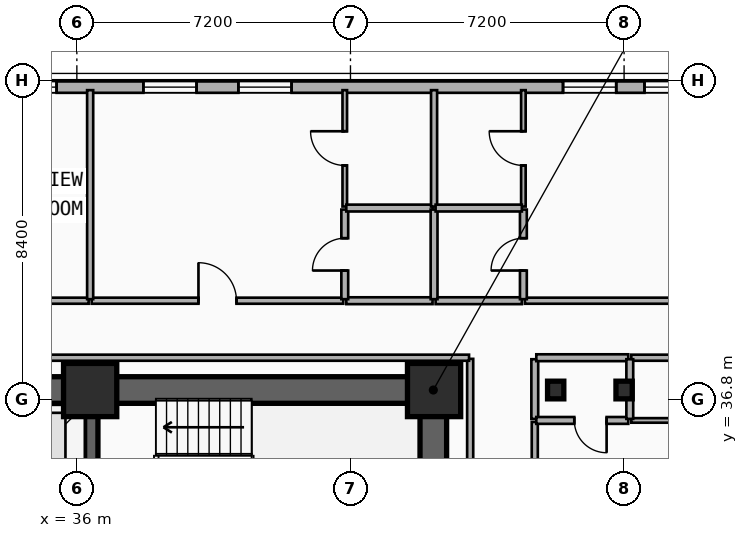
"""IFC4 building model, lengths in metres.
Left out: names, types, materials, properties, quantities, classifications, styles, units other than length and angle.
Written with IfcOpenShell. Run it as: python <this file> out.ifc"""

import sys

from ifc_helpers import new_model, si_unit, direction, frame, frame_2d, origin, origin_2d, place, context, subcontext, project, spatial, rectangle, i_section, extrude, element, fill, save


model = new_model("IFC4")
c1 = context("Model", 3, precision=1e-05, world=origin(), true_north=direction((0.0, 1.0)))
c2 = subcontext(c1, "Body", "Model", "MODEL_VIEW")
j1 = project(units=[si_unit("LENGTHUNIT", "METRE"), si_unit("PLANEANGLEUNIT", "RADIAN")], contexts=[c1])
p1 = place(None, origin())
s1 = spatial("IfcSite", under=j1, at=p1, CompositionType="ELEMENT")
p2 = place(p1, origin())
s2 = spatial("IfcBuilding", under=s1, at=p2, CompositionType="ELEMENT")
p3 = place(p2, frame((0.0, 0.0, 39.5)))
s3 = spatial("IfcBuildingStorey", under=s2, at=p3, CompositionType="ELEMENT", Elevation=39.5)
p4 = place(p3, frame((12.15, 37.05, 0.0), z_axis=(0.0, 0.0, 1.0), x_axis=(1.0, 0.0, 0.0)))
e1 = element("IfcWall", 1, at=p4, inside=s3, PredefinedType="SHEAR", context=c2, shape_type="SweptSolid", body=[
    extrude(rectangle(XDim=33.23, YDim=0.7, at=frame_2d((16.615, 0.0))), origin(), (0.0, 0.0, 1.0), 3.5),
])
p5 = place(p3, frame((45.38, 28.17, 0.0), z_axis=(0.0, 0.0, 1.0), x_axis=(0.0, 1.0, 0.0)))
e2 = element("IfcWall", 2, at=p5, inside=s3, PredefinedType="SHEAR", context=c2, shape_type="SweptSolid", body=[
    extrude(rectangle(XDim=8.53, YDim=0.7, at=frame_2d((4.265, 0.0))), origin(), (0.0, 0.0, 1.0), 3.5),
])
p6 = place(p3, frame((36.38, 28.17, 0.0), z_axis=(0.0, 0.0, 1.0), x_axis=(0.0, 1.0, 0.0)))
e3 = element("IfcWall", 3, at=p6, inside=s3, PredefinedType="SHEAR", context=c2, shape_type="SweptSolid", body=[
    extrude(rectangle(XDim=8.53, YDim=0.35, at=frame_2d((4.265, 0.0))), origin(), (0.0, 0.0, 1.0), 3.5),
])
p7 = place(p6, frame((3.61, 0.0, 0.0)))
e4 = element("IfcOpeningElement", 4, at=p7, cuts=e3, PredefinedType="OPENING", context=c2, shape_type="SweptSolid", body=[
    extrude(rectangle(XDim=1.1, YDim=2.15, at=frame_2d((0.55, 1.075))), frame((0.0, 0.185, 0.0), z_axis=(0.0, -1.0, 0.0), x_axis=(1.0, 0.0, 0.0)), (0.0, 0.0, 1.0), 0.37),
])
for number, where, z_axis, x_axis in (
    (5, (36.35, 37.05, 0.0), (0.0, 0.0, 1.0), (1.0, 0.0, 0.0)),
    (6, (45.4, 37.05, 0.0), (0.0, 0.0, 1.0), (1.0, 0.0, 0.0)),
):
    element("IfcColumn", number, at=place(p3, frame(where, z_axis=z_axis, x_axis=x_axis)), inside=s3, PredefinedType="COLUMN", context=c2, shape_type="SweptSolid", body=[
        extrude(rectangle(XDim=1.4, YDim=1.4, at=origin_2d()), origin(), (0.0, 0.0, 1.0), 3.5),
    ])
for number, where, z_axis, x_axis in (
    (7, (48.6, 37.05, 0.0), (0.0, 0.0, 1.0), (1.0, 0.0, 0.0)),
    (8, (50.4, 37.05, 0.0), (0.0, 0.0, 1.0), (1.0, 0.0, 0.0)),
):
    element("IfcColumn", number, at=place(p3, frame(where, z_axis=z_axis, x_axis=x_axis)), inside=s3, PredefinedType="COLUMN", context=c2, shape_type="SweptSolid", body=[
        extrude(i_section(OverallWidth=0.428, OverallDepth=0.465, WebThickness=0.045, FlangeThickness=0.073, FilletRadius=0.015, at=origin_2d()), origin(), (0.0, 0.0, 1.0), 3.5),
    ])
p8 = place(p3, frame((4.2, 45.02, 0.0), z_axis=(0.0, 0.0, 1.0), x_axis=(1.0, 0.0, 0.0)))
e9 = element("IfcWall", 9, at=p8, inside=s3, PredefinedType="SOLIDWALL", context=c2, shape_type="SweptSolid", body=[
    extrude(rectangle(XDim=49.2, YDim=0.3, at=frame_2d((24.6, 0.0))), origin(), (0.0, 0.0, 1.0), 3.24),
])
p9 = place(p8, frame((5.87, 0.0, 0.85)))
e10 = element("IfcOpeningElement", 10, at=p9, cuts=e9, PredefinedType="OPENING", context=c2, shape_type="SweptSolid", body=[
    extrude(rectangle(XDim=1.4, YDim=1.8, at=frame_2d((0.7, 0.9))), frame((0.0, 0.16, 0.0), z_axis=(0.0, -1.0, 0.0), x_axis=(1.0, 0.0, 0.0)), (0.0, 0.0, 1.0), 0.32),
])
p10 = place(p8, frame((8.481, 0.0, 0.85)))
e11 = element("IfcOpeningElement", 11, at=p10, cuts=e9, PredefinedType="OPENING", context=c2, shape_type="SweptSolid", body=[
    extrude(rectangle(XDim=1.4, YDim=1.8, at=frame_2d((0.7, 0.9))), frame((0.0, 0.16, 0.0), z_axis=(0.0, -1.0, 0.0), x_axis=(1.0, 0.0, 0.0)), (0.0, 0.0, 1.0), 0.32),
])
p11 = place(p8, frame((18.227, 0.0, 0.85)))
e12 = element("IfcOpeningElement", 12, at=p11, cuts=e9, PredefinedType="OPENING", context=c2, shape_type="SweptSolid", body=[
    extrude(rectangle(XDim=1.4, YDim=1.8, at=frame_2d((0.7, 0.9))), frame((0.0, 0.16, 0.0), z_axis=(0.0, -1.0, 0.0), x_axis=(1.0, 0.0, 0.0)), (0.0, 0.0, 1.0), 0.32),
])
p12 = place(p8, frame((21.462, 0.0, 0.85)))
e13 = element("IfcOpeningElement", 13, at=p12, cuts=e9, PredefinedType="OPENING", context=c2, shape_type="SweptSolid", body=[
    extrude(rectangle(XDim=1.4, YDim=1.8, at=frame_2d((0.7, 0.9))), frame((0.0, 0.16, 0.0), z_axis=(0.0, -1.0, 0.0), x_axis=(1.0, 0.0, 0.0)), (0.0, 0.0, 1.0), 0.32),
])
p13 = place(p8, frame((27.884, 0.0, 0.85)))
e14 = element("IfcOpeningElement", 14, at=p13, cuts=e9, PredefinedType="OPENING", context=c2, shape_type="SweptSolid", body=[
    extrude(rectangle(XDim=1.4, YDim=1.8, at=frame_2d((0.7, 0.9))), frame((0.0, 0.16, 0.0), z_axis=(0.0, -1.0, 0.0), x_axis=(1.0, 0.0, 0.0)), (0.0, 0.0, 1.0), 0.32),
])
p14 = place(p8, frame((29.867, 0.0, 0.85)))
e15 = element("IfcOpeningElement", 15, at=p14, cuts=e9, PredefinedType="OPENING", context=c2, shape_type="SweptSolid", body=[
    extrude(rectangle(XDim=1.4, YDim=1.8, at=frame_2d((0.7, 0.9))), frame((0.0, 0.16, 0.0), z_axis=(0.0, -1.0, 0.0), x_axis=(1.0, 0.0, 0.0)), (0.0, 0.0, 1.0), 0.32),
])
p15 = place(p8, frame((33.55, 0.0, 0.85)))
e16 = element("IfcOpeningElement", 16, at=p15, cuts=e9, PredefinedType="OPENING", context=c2, shape_type="SweptSolid", body=[
    extrude(rectangle(XDim=1.4, YDim=1.8, at=frame_2d((0.7, 0.9))), frame((0.0, 0.16, 0.0), z_axis=(0.0, -1.0, 0.0), x_axis=(1.0, 0.0, 0.0)), (0.0, 0.0, 1.0), 0.32),
])
p16 = place(p8, frame((36.05, 0.0, 0.85)))
e17 = element("IfcOpeningElement", 17, at=p16, cuts=e9, PredefinedType="OPENING", context=c2, shape_type="SweptSolid", body=[
    extrude(rectangle(XDim=1.4, YDim=1.8, at=frame_2d((0.7, 0.9))), frame((0.0, 0.16, 0.0), z_axis=(0.0, -1.0, 0.0), x_axis=(1.0, 0.0, 0.0)), (0.0, 0.0, 1.0), 0.32),
])
p17 = place(p8, frame((44.593, 0.0, 0.85)))
e18 = element("IfcOpeningElement", 18, at=p17, cuts=e9, PredefinedType="OPENING", context=c2, shape_type="SweptSolid", body=[
    extrude(rectangle(XDim=1.4, YDim=1.8, at=frame_2d((0.7, 0.9))), frame((0.0, 0.16, 0.0), z_axis=(0.0, -1.0, 0.0), x_axis=(1.0, 0.0, 0.0)), (0.0, 0.0, 1.0), 0.32),
])
p18 = place(p8, frame((46.737, 0.0, 0.85)))
e19 = element("IfcOpeningElement", 19, at=p18, cuts=e9, PredefinedType="OPENING", context=c2, shape_type="SweptSolid", body=[
    extrude(rectangle(XDim=1.4, YDim=1.8, at=frame_2d((0.7, 0.9))), frame((0.0, 0.16, 0.0), z_axis=(0.0, -1.0, 0.0), x_axis=(1.0, 0.0, 0.0)), (0.0, 0.0, 1.0), 0.32),
])
p19 = place(p3, frame((48.05, 33.149, 0.0), z_axis=(0.0, 0.0, 1.0), x_axis=(0.0, 1.0, 0.0)))
e20 = element("IfcWall", 20, at=p19, inside=s3, PredefinedType="PARTITIONING", context=c2, shape_type="SweptSolid", body=[
    extrude(rectangle(XDim=3.061, YDim=0.16, at=frame_2d((1.531, 0.0))), origin(), (0.0, 0.0, 1.0), 3.24),
])
p20 = place(p19, frame((1.031, 0.0, 0.0)))
e21 = element("IfcOpeningElement", 21, at=p20, cuts=e20, PredefinedType="OPENING", context=c2, shape_type="SweptSolid", body=[
    extrude(rectangle(XDim=1.0, YDim=2.15, at=frame_2d((0.5, 1.075))), frame((0.0, 0.09, 0.0), z_axis=(0.0, -1.0, 0.0), x_axis=(1.0, 0.0, 0.0)), (0.0, 0.0, 1.0), 0.18),
])
p21 = place(p3, frame((48.05, 36.29, 0.0), z_axis=(0.0, 0.0, 1.0), x_axis=(0.0, 1.0, 0.0)))
e22 = element("IfcWall", 22, at=p21, inside=s3, PredefinedType="PLUMBINGWALL", context=c2, shape_type="SweptSolid", body=[
    extrude(rectangle(XDim=1.57, YDim=0.18, at=frame_2d((0.785, 0.0))), origin(), (0.0, 0.0, 1.0), 2.72),
])
p22 = place(p3, frame((48.09, 37.9, 0.0), z_axis=(0.0, 0.0, 1.0), x_axis=(1.0, 0.0, 0.0)))
e23 = element("IfcWall", 23, at=p22, inside=s3, PredefinedType="PLUMBINGWALL", context=c2, shape_type="SweptSolid", body=[
    extrude(rectangle(XDim=2.42, YDim=0.18, at=frame_2d((1.21, 0.0))), origin(), (0.0, 0.0, 1.0), 3.24),
])
p23 = place(p3, frame((50.59, 37.9, 0.0), z_axis=(0.0, 0.0, 1.0), x_axis=(1.0, 0.0, 0.0)))
e24 = element("IfcWall", 24, at=p23, inside=s3, PredefinedType="PARTITIONING", context=c2, shape_type="SweptSolid", body=[
    extrude(rectangle(XDim=6.75, YDim=0.16, at=frame_2d((3.375, 0.0))), origin(), (0.0, 0.0, 1.0), 3.24),
])
p24 = place(p3, frame((31.241, 39.4, 0.0), z_axis=(0.0, 0.0, 1.0), x_axis=(1.0, 0.0, 0.0)))
e25 = element("IfcWall", 25, at=p24, inside=s3, PredefinedType="PARTITIONING", context=c2, shape_type="SweptSolid", body=[
    extrude(rectangle(XDim=5.069, YDim=0.16, at=frame_2d((2.535, 0.0))), origin(), (0.0, 0.0, 1.0), 3.24),
])
p25 = place(p24, frame((2.034, 0.0, 0.0)))
e26 = element("IfcOpeningElement", 26, at=p25, cuts=e25, PredefinedType="OPENING", context=c2, shape_type="SweptSolid", body=[
    extrude(rectangle(XDim=1.0, YDim=2.15, at=frame_2d((0.5, 1.075))), frame((0.0, 0.09, 0.0), z_axis=(0.0, -1.0, 0.0), x_axis=(1.0, 0.0, 0.0)), (0.0, 0.0, 1.0), 0.18),
])
p26 = place(p3, frame((36.39, 39.4, 0.0), z_axis=(0.0, 0.0, 1.0), x_axis=(1.0, 0.0, 0.0)))
e27 = element("IfcWall", 27, at=p26, inside=s3, PredefinedType="PARTITIONING", context=c2, shape_type="SweptSolid", body=[
    extrude(rectangle(XDim=6.62, YDim=0.16, at=frame_2d((3.31, 0.0))), origin(), (0.0, 0.0, 1.0), 3.24),
])
p27 = place(p26, frame((2.81, 0.0, 0.0)))
e28 = element("IfcOpeningElement", 28, at=p27, cuts=e27, PredefinedType="OPENING", context=c2, shape_type="SweptSolid", body=[
    extrude(rectangle(XDim=1.0, YDim=2.15, at=frame_2d((0.5, 1.075))), frame((0.0, 0.09, 0.0), z_axis=(0.0, -1.0, 0.0), x_axis=(1.0, 0.0, 0.0)), (0.0, 0.0, 1.0), 0.18),
])
p28 = place(p3, frame((43.09, 39.4, 0.0), z_axis=(0.0, 0.0, 1.0), x_axis=(1.0, 0.0, 0.0)))
e29 = element("IfcWall", 29, at=p28, inside=s3, PredefinedType="PLUMBINGWALL", context=c2, shape_type="SweptSolid", body=[
    extrude(rectangle(XDim=2.27, YDim=0.18, at=frame_2d((1.135, 0.0))), origin(), (0.0, 0.0, 1.0), 3.24),
])
p29 = place(p3, frame((47.79, 39.4, 0.0), z_axis=(0.0, 0.0, 1.0), x_axis=(1.0, 0.0, 0.0)))
e30 = element("IfcWall", 30, at=p29, inside=s3, PredefinedType="PARTITIONING", context=c2, shape_type="SweptSolid", body=[
    extrude(rectangle(XDim=9.55, YDim=0.16, at=frame_2d((4.775, 0.0))), origin(), (0.0, 0.0, 1.0), 3.24),
])
p30 = place(p29, frame((4.275, 0.0, 0.0)))
e31 = element("IfcOpeningElement", 31, at=p30, cuts=e30, PredefinedType="OPENING", context=c2, shape_type="SweptSolid", body=[
    extrude(rectangle(XDim=1.0, YDim=2.15, at=frame_2d((0.5, 1.075))), frame((0.0, 0.09, 0.0), z_axis=(0.0, -1.0, 0.0), x_axis=(1.0, 0.0, 0.0)), (0.0, 0.0, 1.0), 0.18),
])
p31 = place(p3, frame((45.44, 39.4, 0.0), z_axis=(0.0, 0.0, 1.0), x_axis=(1.0, 0.0, 0.0)))
e32 = element("IfcWall", 32, at=p31, inside=s3, PredefinedType="PLUMBINGWALL", context=c2, shape_type="SweptSolid", body=[
    extrude(rectangle(XDim=2.27, YDim=0.18, at=frame_2d((1.135, 0.0))), origin(), (0.0, 0.0, 1.0), 3.24),
])
p32 = place(p3, frame((50.51, 36.25, 0.0), z_axis=(0.0, 0.0, 1.0), x_axis=(-1.0, 0.0, 0.0)))
e33 = element("IfcWall", 33, at=p32, inside=s3, PredefinedType="PLUMBINGWALL", context=c2, shape_type="SweptSolid", body=[
    extrude(rectangle(XDim=2.42, YDim=0.18, at=frame_2d((1.21, 0.0))), origin(), (0.0, 0.0, 1.0), 2.57),
])
p33 = place(p32, frame((0.57, 0.0, 0.0)))
e34 = element("IfcOpeningElement", 34, at=p33, cuts=e33, PredefinedType="OPENING", context=c2, shape_type="SweptSolid", body=[
    extrude(rectangle(XDim=0.85, YDim=2.1, at=frame_2d((0.425, 1.05))), frame((0.0, 0.1, 0.0), z_axis=(0.0, -1.0, 0.0), x_axis=(1.0, 0.0, 0.0)), (0.0, 0.0, 1.0), 0.2),
])
p34 = place(p3, frame((50.59, 36.25, 0.0), z_axis=(0.0, 0.0, 1.0), x_axis=(1.0, 0.0, 0.0)))
e35 = element("IfcWall", 35, at=p34, inside=s3, PredefinedType="PARTITIONING", context=c2, shape_type="SweptSolid", body=[
    extrude(rectangle(XDim=6.75, YDim=0.12, at=frame_2d((3.375, 0.0))), origin(), (0.0, 0.0, 1.0), 2.57),
])
p35 = place(p34, frame((2.925, 0.0, 0.0)))
e36 = element("IfcOpeningElement", 36, at=p35, cuts=e35, PredefinedType="OPENING", context=c2, shape_type="SweptSolid", body=[
    extrude(rectangle(XDim=0.9, YDim=2.1, at=frame_2d((0.45, 1.05))), frame((0.0, 0.07, 0.0), z_axis=(0.0, -1.0, 0.0), x_axis=(1.0, 0.0, 0.0)), (0.0, 0.0, 1.0), 0.14),
])
p36 = place(p3, frame((50.55, 36.29, 0.0), z_axis=(0.0, 0.0, 1.0), x_axis=(0.0, 1.0, 0.0)))
e37 = element("IfcWall", 37, at=p36, inside=s3, PredefinedType="PLUMBINGWALL", context=c2, shape_type="SweptSolid", body=[
    extrude(rectangle(XDim=1.57, YDim=0.18, at=frame_2d((0.785, 0.0))), origin(), (0.0, 0.0, 1.0), 2.57),
])
p37 = place(p3, frame((36.35, 39.44, 0.0), z_axis=(0.0, 0.0, 1.0), x_axis=(0.0, 1.0, 0.0)))
e38 = element("IfcWall", 38, at=p37, inside=s3, PredefinedType="PARTITIONING", context=c2, shape_type="SweptSolid", body=[
    extrude(rectangle(XDim=5.5, YDim=0.16, at=frame_2d((2.75, 0.0))), origin(), (0.0, 0.0, 1.0), 3.24),
])
p38 = place(p3, frame((43.05, 39.44, 0.0), z_axis=(0.0, 0.0, 1.0), x_axis=(0.0, 1.0, 0.0)))
e39 = element("IfcWall", 39, at=p38, inside=s3, PredefinedType="PLUMBINGWALL", context=c2, shape_type="SweptSolid", body=[
    extrude(rectangle(XDim=2.358, YDim=0.18, at=frame_2d((1.179, 0.0))), origin(), (0.0, 0.0, 1.0), 3.24),
])
p39 = place(p38, frame((0.754, 0.0, 0.0)))
e40 = element("IfcOpeningElement", 40, at=p39, cuts=e39, PredefinedType="OPENING", context=c2, shape_type="SweptSolid", body=[
    extrude(rectangle(XDim=0.85, YDim=2.1, at=frame_2d((0.425, 1.05))), frame((0.0, 0.1, 0.0), z_axis=(0.0, -1.0, 0.0), x_axis=(1.0, 0.0, 0.0)), (0.0, 0.0, 1.0), 0.2),
])
p40 = place(p3, frame((43.05, 41.878, 0.0), z_axis=(0.0, 0.0, 1.0), x_axis=(0.0, 1.0, 0.0)))
e41 = element("IfcWall", 41, at=p40, inside=s3, PredefinedType="PARTITIONING", context=c2, shape_type="SweptSolid", body=[
    extrude(rectangle(XDim=3.062, YDim=0.12, at=frame_2d((1.531, 0.0))), origin(), (0.0, 0.0, 1.0), 3.24),
])
p41 = place(p40, frame((1.081, 0.0, 0.0)))
e42 = element("IfcOpeningElement", 42, at=p41, cuts=e41, PredefinedType="OPENING", context=c2, shape_type="SweptSolid", body=[
    extrude(rectangle(XDim=0.9, YDim=2.1, at=frame_2d((0.45, 1.05))), frame((0.0, 0.07, 0.0), z_axis=(0.0, -1.0, 0.0), x_axis=(1.0, 0.0, 0.0)), (0.0, 0.0, 1.0), 0.14),
])
p42 = place(p3, frame((43.09, 41.838, 0.0), z_axis=(0.0, 0.0, 1.0), x_axis=(1.0, 0.0, 0.0)))
e43 = element("IfcWall", 43, at=p42, inside=s3, PredefinedType="PLUMBINGWALL", context=c2, shape_type="SweptSolid", body=[
    extrude(rectangle(XDim=2.27, YDim=0.18, at=frame_2d((1.135, 0.0))), origin(), (0.0, 0.0, 1.0), 3.24),
])
p43 = place(p3, frame((45.4, 39.44, 0.0), z_axis=(0.0, 0.0, 1.0), x_axis=(0.0, 1.0, 0.0)))
e44 = element("IfcWall", 44, at=p43, inside=s3, PredefinedType="PLUMBINGWALL", context=c2, shape_type="SweptSolid", body=[
    extrude(rectangle(XDim=2.358, YDim=0.18, at=frame_2d((1.179, 0.0))), origin(), (0.0, 0.0, 1.0), 3.24),
])
p44 = place(p3, frame((45.4, 41.878, 0.0), z_axis=(0.0, 0.0, 1.0), x_axis=(0.0, 1.0, 0.0)))
e45 = element("IfcWall", 45, at=p44, inside=s3, PredefinedType="PARTITIONING", context=c2, shape_type="SweptSolid", body=[
    extrude(rectangle(XDim=3.062, YDim=0.16, at=frame_2d((1.531, 0.0))), origin(), (0.0, 0.0, 1.0), 3.24),
])
p45 = place(p3, frame((47.75, 39.44, 0.0), z_axis=(0.0, 0.0, 1.0), x_axis=(0.0, 1.0, 0.0)))
e46 = element("IfcWall", 46, at=p45, inside=s3, PredefinedType="PLUMBINGWALL", context=c2, shape_type="SweptSolid", body=[
    extrude(rectangle(XDim=2.358, YDim=0.18, at=frame_2d((1.179, 0.0))), origin(), (0.0, 0.0, 1.0), 3.24),
])
p46 = place(p45, frame((0.754, 0.0, 0.0)))
e47 = element("IfcOpeningElement", 47, at=p46, cuts=e46, PredefinedType="OPENING", context=c2, shape_type="SweptSolid", body=[
    extrude(rectangle(XDim=0.85, YDim=2.1, at=frame_2d((0.425, 1.05))), frame((0.0, 0.1, 0.0), z_axis=(0.0, -1.0, 0.0), x_axis=(1.0, 0.0, 0.0)), (0.0, 0.0, 1.0), 0.2),
])
p47 = place(p3, frame((47.75, 41.878, 0.0), z_axis=(0.0, 0.0, 1.0), x_axis=(0.0, 1.0, 0.0)))
e48 = element("IfcWall", 48, at=p47, inside=s3, PredefinedType="PARTITIONING", context=c2, shape_type="SweptSolid", body=[
    extrude(rectangle(XDim=3.062, YDim=0.12, at=frame_2d((1.531, 0.0))), origin(), (0.0, 0.0, 1.0), 3.24),
])
p48 = place(p47, frame((1.081, 0.0, 0.0)))
e49 = element("IfcOpeningElement", 49, at=p48, cuts=e48, PredefinedType="OPENING", context=c2, shape_type="SweptSolid", body=[
    extrude(rectangle(XDim=0.9, YDim=2.1, at=frame_2d((0.45, 1.05))), frame((0.0, 0.07, 0.0), z_axis=(0.0, -1.0, 0.0), x_axis=(1.0, 0.0, 0.0)), (0.0, 0.0, 1.0), 0.14),
])
p49 = place(p3, frame((45.44, 41.838, 0.0), z_axis=(0.0, 0.0, 1.0), x_axis=(1.0, 0.0, 0.0)))
e50 = element("IfcWall", 50, at=p49, inside=s3, PredefinedType="PLUMBINGWALL", context=c2, shape_type="SweptSolid", body=[
    extrude(rectangle(XDim=2.27, YDim=0.18, at=frame_2d((1.135, 0.0))), origin(), (0.0, 0.0, 1.0), 3.24),
])
p50 = place(p3, frame((46.35, 27.63, 0.0), z_axis=(0.0, 0.0, 1.0), x_axis=(0.0, 1.0, 0.0)))
e51 = element("IfcWall", 51, at=p50, inside=s3, PredefinedType="PARTITIONING", context=c2, shape_type="SweptSolid", body=[
    extrude(rectangle(XDim=10.24, YDim=0.16, at=frame_2d((5.12, 0.0))), origin(), (0.0, 0.0, 1.0), 2.72),
])
p51 = place(p3, frame((11.28, 37.9, 0.0), z_axis=(0.0, 0.0, 1.0), x_axis=(1.0, 0.0, 0.0)))
e52 = element("IfcWall", 52, at=p51, inside=s3, PredefinedType="PARTITIONING", context=c2, shape_type="SweptSolid", body=[
    extrude(rectangle(XDim=35.04, YDim=0.16, at=frame_2d((17.52, 0.0))), origin(), (0.0, 0.0, 1.0), 3.24),
])
p52 = place(p14, origin())
e53 = element("IfcWindow", 53, at=p52, inside=s3, PartitioningType="SINGLE_PANEL", PredefinedType="WINDOW", context=c2, shape_type="SweptSolid", body=[
    extrude(rectangle(XDim=1.4, YDim=1.8, at=frame_2d((0.7, 0.9))), frame((0.0, 0.03, 0.0), z_axis=(0.0, -1.0, 0.0), x_axis=(1.0, 0.0, 0.0)), (0.0, 0.0, 1.0), 0.06),
])
fill(e15, e53)
p53 = place(p15, origin())
e54 = element("IfcWindow", 54, at=p53, inside=s3, PartitioningType="SINGLE_PANEL", PredefinedType="WINDOW", context=c2, shape_type="SweptSolid", body=[
    extrude(rectangle(XDim=1.4, YDim=1.8, at=frame_2d((0.7, 0.9))), frame((0.0, 0.03, 0.0), z_axis=(0.0, -1.0, 0.0), x_axis=(1.0, 0.0, 0.0)), (0.0, 0.0, 1.0), 0.06),
])
fill(e16, e54)
p54 = place(p16, origin())
e55 = element("IfcWindow", 55, at=p54, inside=s3, PartitioningType="SINGLE_PANEL", PredefinedType="WINDOW", context=c2, shape_type="SweptSolid", body=[
    extrude(rectangle(XDim=1.4, YDim=1.8, at=frame_2d((0.7, 0.9))), frame((0.0, 0.03, 0.0), z_axis=(0.0, -1.0, 0.0), x_axis=(1.0, 0.0, 0.0)), (0.0, 0.0, 1.0), 0.06),
])
fill(e17, e55)
p55 = place(p17, origin())
e56 = element("IfcWindow", 56, at=p55, inside=s3, PartitioningType="SINGLE_PANEL", PredefinedType="WINDOW", context=c2, shape_type="SweptSolid", body=[
    extrude(rectangle(XDim=1.4, YDim=1.8, at=frame_2d((0.7, 0.9))), frame((0.0, 0.03, 0.0), z_axis=(0.0, -1.0, 0.0), x_axis=(1.0, 0.0, 0.0)), (0.0, 0.0, 1.0), 0.06),
])
fill(e18, e56)
p56 = place(p18, origin())
e57 = element("IfcWindow", 57, at=p56, inside=s3, PartitioningType="SINGLE_PANEL", PredefinedType="WINDOW", context=c2, shape_type="SweptSolid", body=[
    extrude(rectangle(XDim=1.4, YDim=1.8, at=frame_2d((0.7, 0.9))), frame((0.0, 0.03, 0.0), z_axis=(0.0, -1.0, 0.0), x_axis=(1.0, 0.0, 0.0)), (0.0, 0.0, 1.0), 0.06),
])
fill(e19, e57)
p57 = place(p27, origin())
e58 = element("IfcDoor", 58, at=p57, inside=s3, OperationType="SINGLE_SWING_LEFT", PredefinedType="DOOR", context=c2, shape_type="SweptSolid", body=[
    extrude(rectangle(XDim=1.0, YDim=2.15, at=frame_2d((0.5, 1.075))), frame((0.0, 0.025, 0.0), z_axis=(0.0, -1.0, 0.0), x_axis=(1.0, 0.0, 0.0)), (0.0, 0.0, 1.0), 0.05),
])
fill(e28, e58)
p58 = place(p33, origin())
e59 = element("IfcDoor", 59, at=p58, inside=s3, OperationType="SINGLE_SWING_LEFT", PredefinedType="DOOR", context=c2, shape_type="SweptSolid", body=[
    extrude(rectangle(XDim=0.85, YDim=2.1, at=frame_2d((0.425, 1.05))), frame((0.0, 0.025, 0.0), z_axis=(0.0, -1.0, 0.0), x_axis=(1.0, 0.0, 0.0)), (0.0, 0.0, 1.0), 0.05),
])
fill(e34, e59)
p59 = place(p39, origin())
e60 = element("IfcDoor", 60, at=p59, inside=s3, OperationType="SINGLE_SWING_LEFT", PredefinedType="DOOR", context=c2, shape_type="SweptSolid", body=[
    extrude(rectangle(XDim=0.85, YDim=2.1, at=frame_2d((0.425, 1.05))), frame((0.0, 0.025, 0.0), z_axis=(0.0, -1.0, 0.0), x_axis=(1.0, 0.0, 0.0)), (0.0, 0.0, 1.0), 0.05),
])
fill(e40, e60)
p60 = place(p41, origin())
e61 = element("IfcDoor", 61, at=p60, inside=s3, OperationType="SINGLE_SWING_RIGHT", PredefinedType="DOOR", context=c2, shape_type="SweptSolid", body=[
    extrude(rectangle(XDim=0.9, YDim=2.1, at=frame_2d((0.45, 1.05))), frame((0.0, 0.025, 0.0), z_axis=(0.0, -1.0, 0.0), x_axis=(1.0, 0.0, 0.0)), (0.0, 0.0, 1.0), 0.05),
])
fill(e42, e61)
p61 = place(p46, origin())
e62 = element("IfcDoor", 62, at=p61, inside=s3, OperationType="SINGLE_SWING_LEFT", PredefinedType="DOOR", context=c2, shape_type="SweptSolid", body=[
    extrude(rectangle(XDim=0.85, YDim=2.1, at=frame_2d((0.425, 1.05))), frame((0.0, 0.025, 0.0), z_axis=(0.0, -1.0, 0.0), x_axis=(1.0, 0.0, 0.0)), (0.0, 0.0, 1.0), 0.05),
])
fill(e47, e62)
p62 = place(p48, origin())
e63 = element("IfcDoor", 63, at=p62, inside=s3, OperationType="SINGLE_SWING_RIGHT", PredefinedType="DOOR", context=c2, shape_type="SweptSolid", body=[
    extrude(rectangle(XDim=0.9, YDim=2.1, at=frame_2d((0.45, 1.05))), frame((0.0, 0.025, 0.0), z_axis=(0.0, -1.0, 0.0), x_axis=(1.0, 0.0, 0.0)), (0.0, 0.0, 1.0), 0.05),
])
fill(e49, e63)
save(model, sys.argv[1])
